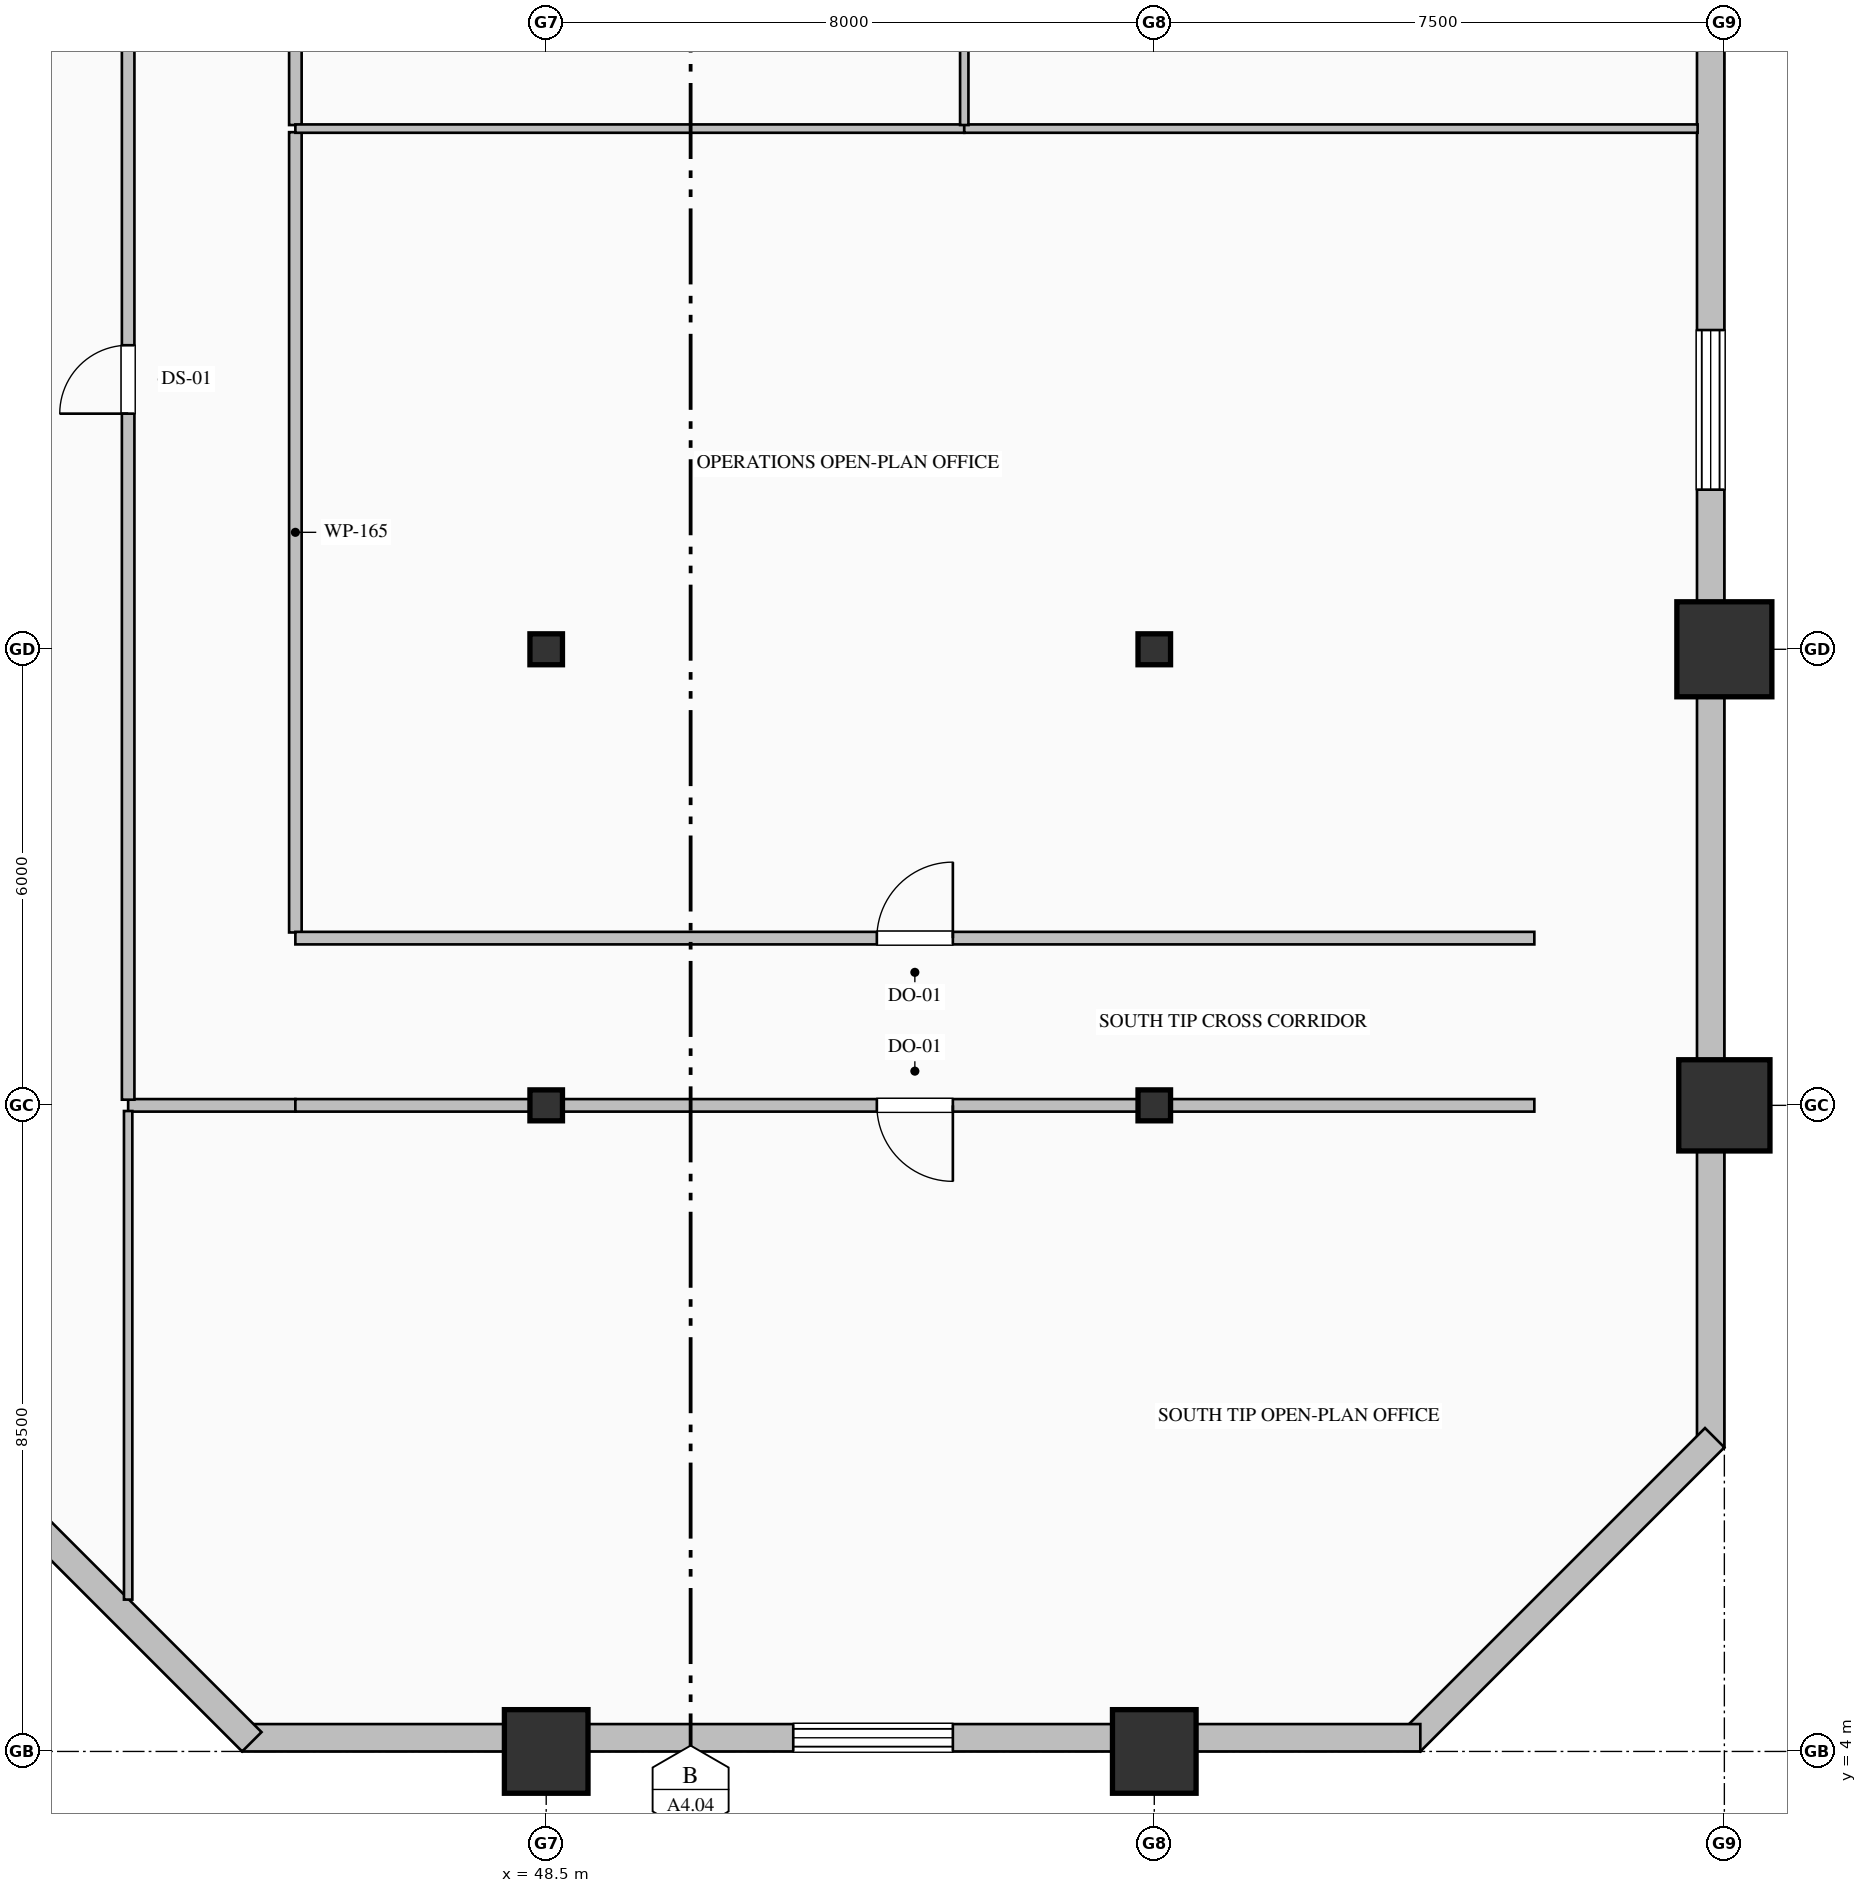
"""IFC4 building model, lengths in metres.
Left out: names, types, materials, properties, quantities, classifications, styles, units other than length and angle.
Written with IfcOpenShell. Run it as: python <this file> out.ifc"""

import sys

from ifc_helpers import new_model, si_unit, direction, frame, frame_2d, origin, origin_2d, place, context, subcontext, project, spatial, rectangle, hollow_rectangle, hollow_circle, i_section, extrude, element, fill, save


model = new_model("IFC4")
c1 = context("Model", 3, precision=1e-05, world=origin(), true_north=direction((0.0, 1.0)))
c2 = subcontext(c1, "Body", "Model", "MODEL_VIEW")
j1 = project(units=[si_unit("LENGTHUNIT", "METRE"), si_unit("PLANEANGLEUNIT", "RADIAN")], contexts=[c1])
p1 = place(None, origin())
s1 = spatial("IfcSite", under=j1, at=p1, CompositionType="ELEMENT")
p2 = place(p1, origin())
s2 = spatial("IfcBuilding", under=s1, at=p2, CompositionType="ELEMENT")
p3 = place(p2, frame((0.0, 0.0, 80.2)))
s3 = spatial("IfcBuildingStorey", under=s2, at=p3, CompositionType="ELEMENT", Elevation=80.2)
p4 = place(p3, frame((48.5, 4.0, 0.0), z_axis=(0.0, 0.0, 1.0), x_axis=(1.0, 0.0, 0.0)))
e1 = element("IfcColumn", 1, at=p4, inside=s3, PredefinedType="COLUMN", context=c2, shape_type="SweptSolid", body=[
    extrude(hollow_rectangle(XDim=1.1, YDim=1.1, WallThickness=0.04, at=origin_2d()), origin(), (0.0, 0.0, 1.0), 4.0),
])
for number, where, z_axis, x_axis in (
    (2, (48.5, 12.5, 0.0), (0.0, 0.0, 1.0), (1.0, 0.0, 0.0)),
    (3, (48.5, 18.5, 0.0), (0.0, 0.0, 1.0), (1.0, 0.0, 0.0)),
):
    element("IfcColumn", number, at=place(p3, frame(where, z_axis=z_axis, x_axis=x_axis)), inside=s3, PredefinedType="COLUMN", context=c2, shape_type="SweptSolid", body=[
        extrude(i_section(OverallWidth=0.407, OverallDepth=0.428, WebThickness=0.02, FlangeThickness=0.035, FilletRadius=0.022, at=origin_2d()), origin(), (0.0, 0.0, 1.0), 4.0),
    ])
p5 = place(p3, frame((56.5, 4.0, 0.0), z_axis=(0.0, 0.0, 1.0), x_axis=(1.0, 0.0, 0.0)))
e4 = element("IfcColumn", 4, at=p5, inside=s3, PredefinedType="COLUMN", context=c2, shape_type="SweptSolid", body=[
    extrude(hollow_rectangle(XDim=1.1, YDim=1.1, WallThickness=0.04, at=origin_2d()), origin(), (0.0, 0.0, 1.0), 4.0),
])
for number, where, z_axis, x_axis in (
    (5, (56.5, 12.5, 0.0), (0.0, 0.0, 1.0), (1.0, 0.0, 0.0)),
    (6, (56.5, 18.5, 0.0), (0.0, 0.0, 1.0), (1.0, 0.0, 0.0)),
):
    element("IfcColumn", number, at=place(p3, frame(where, z_axis=z_axis, x_axis=x_axis)), inside=s3, PredefinedType="COLUMN", context=c2, shape_type="SweptSolid", body=[
        extrude(i_section(OverallWidth=0.407, OverallDepth=0.428, WebThickness=0.02, FlangeThickness=0.035, FilletRadius=0.022, at=origin_2d()), origin(), (0.0, 0.0, 1.0), 4.0),
    ])
p6 = place(p3, frame((64.0, 12.5, 0.0), z_axis=(0.0, 0.0, 1.0), x_axis=(1.0, 0.0, 0.0)))
e7 = element("IfcColumn", 7, at=p6, inside=s3, PredefinedType="COLUMN", context=c2, shape_type="SweptSolid", body=[
    extrude(hollow_circle(Radius=0.6, WallThickness=0.04, at=origin_2d()), origin(), (0.0, 0.0, 1.0), 4.0),
])
p7 = place(p3, frame((64.0, 18.5, 0.0), z_axis=(0.0, 0.0, 1.0), x_axis=(1.0, 0.0, 0.0)))
e8 = element("IfcColumn", 8, at=p7, inside=s3, PredefinedType="COLUMN", context=c2, shape_type="SweptSolid", body=[
    extrude(hollow_rectangle(XDim=1.25, YDim=1.25, WallThickness=0.045, at=origin_2d()), origin(), (0.0, 0.0, 1.0), 4.0),
])
p8 = place(p3, frame((63.82, 36.05, 0.0), z_axis=(0.0, 0.0, 1.0), x_axis=(0.0, -1.0, 0.0)))
e9 = element("IfcWall", 9, at=p8, inside=s3, PredefinedType="SOLIDWALL", context=c2, shape_type="SweptSolid", body=[
    extrude(rectangle(XDim=28.05, YDim=0.36, at=frame_2d((14.025, 0.0))), origin(), (0.0, 0.0, 1.0), 3.25),
])
p9 = place(p8, frame((2.55, 0.0, 0.85)))
e10 = element("IfcOpeningElement", 10, at=p9, cuts=e9, PredefinedType="OPENING", context=c2, shape_type="SweptSolid", body=[
    extrude(rectangle(XDim=2.1, YDim=2.05, at=frame_2d((1.05, 1.025))), frame((0.0, 0.19, 0.0), z_axis=(0.0, -1.0, 0.0), x_axis=(1.0, 0.0, 0.0)), (0.0, 0.0, 1.0), 0.38),
])
p10 = place(p8, frame((13.35, 0.0, 0.85)))
e11 = element("IfcOpeningElement", 11, at=p10, cuts=e9, PredefinedType="OPENING", context=c2, shape_type="SweptSolid", body=[
    extrude(rectangle(XDim=2.1, YDim=2.05, at=frame_2d((1.05, 1.025))), frame((0.0, 0.19, 0.0), z_axis=(0.0, -1.0, 0.0), x_axis=(1.0, 0.0, 0.0)), (0.0, 0.0, 1.0), 0.38),
])
p11 = place(p3, frame((63.873, 8.127, 0.0), z_axis=(0.0, 0.0, 1.0), x_axis=(-0.707106781187, -0.707106781187, 0.0)))
e12 = element("IfcWall", 12, at=p11, inside=s3, PredefinedType="SOLIDWALL", context=c2, shape_type="SweptSolid", body=[
    extrude(rectangle(XDim=5.657, YDim=0.36, at=frame_2d((2.828, 0.0))), origin(), (0.0, 0.0, 1.0), 3.75),
])
p12 = place(p3, frame((60.0, 4.18, 0.0), z_axis=(0.0, 0.0, 1.0), x_axis=(-1.0, 0.0, 0.0)))
e13 = element("IfcWall", 13, at=p12, inside=s3, PredefinedType="SOLIDWALL", context=c2, shape_type="SweptSolid", body=[
    extrude(rectangle(XDim=15.5, YDim=0.36, at=frame_2d((7.75, 0.0))), origin(), (0.0, 0.0, 1.0), 3.25),
])
p13 = place(p12, frame((6.15, 0.0, 0.85)))
e14 = element("IfcOpeningElement", 14, at=p13, cuts=e13, PredefinedType="OPENING", context=c2, shape_type="SweptSolid", body=[
    extrude(rectangle(XDim=2.1, YDim=2.05, at=frame_2d((1.05, 1.025))), frame((0.0, 0.19, 0.0), z_axis=(0.0, -1.0, 0.0), x_axis=(1.0, 0.0, 0.0)), (0.0, 0.0, 1.0), 0.38),
])
p14 = place(p3, frame((44.627, 4.127, 0.0), z_axis=(0.0, 0.0, 1.0), x_axis=(-0.707106781187, 0.707106781187, 0.0)))
e15 = element("IfcWall", 15, at=p14, inside=s3, PredefinedType="SOLIDWALL", context=c2, shape_type="SweptSolid", body=[
    extrude(rectangle(XDim=5.657, YDim=0.36, at=frame_2d((2.828, 0.0))), origin(), (0.0, 0.0, 1.0), 3.75),
])
p15 = place(p3, frame((45.2, 12.5, 0.0), z_axis=(0.0, 0.0, 1.0), x_axis=(-1.0, 0.0, 0.0)))
e16 = element("IfcWall", 16, at=p15, inside=s3, PredefinedType="PARTITIONING", context=c2, shape_type="SweptSolid", body=[
    extrude(rectangle(XDim=2.2, YDim=0.165, at=frame_2d((1.1, 0.0))), origin(), (0.0, 0.0, 1.0), 3.042),
])
p16 = place(p3, frame((45.2, 25.303, 0.0), z_axis=(0.0, 0.0, 1.0), x_axis=(0.0, -1.0, 0.0)))
e17 = element("IfcWall", 17, at=p16, inside=s3, PredefinedType="PARTITIONING", context=c2, shape_type="SweptSolid", body=[
    extrude(rectangle(XDim=10.529, YDim=0.165, at=frame_2d((5.264, 0.0))), origin(), (0.0, 0.0, 1.0), 3.75),
])
p17 = place(p3, frame((45.2, 31.525, 0.0), z_axis=(0.0, 0.0, 1.0), x_axis=(0.0, -1.0, 0.0)))
e18 = element("IfcWall", 18, at=p17, inside=s3, PredefinedType="PARTITIONING", context=c2, shape_type="SweptSolid", body=[
    extrude(rectangle(XDim=6.128, YDim=0.165, at=frame_2d((3.064, 0.0))), origin(), (0.0, 0.0, 1.0), 3.75),
])
p18 = place(p3, frame((43.0, 12.574, 0.0), z_axis=(0.0, 0.0, 1.0), x_axis=(0.0, 1.0, 0.0)))
e19 = element("IfcWall", 19, at=p18, inside=s3, PredefinedType="PARTITIONING", context=c2, shape_type="SweptSolid", body=[
    extrude(rectangle(XDim=18.951, YDim=0.165, at=frame_2d((9.476, 0.0))), origin(), (0.0, 0.0, 1.0), 3.75),
])
p19 = place(p18, frame((9.025, 0.0, 0.0)))
e20 = element("IfcOpeningElement", 20, at=p19, cuts=e19, PredefinedType="OPENING", context=c2, shape_type="SweptSolid", body=[
    extrude(rectangle(XDim=0.9, YDim=2.15, at=frame_2d((0.45, 1.075))), frame((0.0, 0.093, 0.0), z_axis=(0.0, -1.0, 0.0), x_axis=(1.0, 0.0, 0.0)), (0.0, 0.0, 1.0), 0.185),
])
p20 = place(p3, frame((61.5, 12.5, 0.0), z_axis=(0.0, 0.0, 1.0), x_axis=(-1.0, 0.0, 0.0)))
e21 = element("IfcWall", 21, at=p20, inside=s3, PredefinedType="PARTITIONING", context=c2, shape_type="SweptSolid", body=[
    extrude(rectangle(XDim=16.3, YDim=0.165, at=frame_2d((8.15, 0.0))), origin(), (0.0, 0.0, 1.0), 3.042),
])
p21 = place(p20, frame((7.65, 0.0, 0.0)))
e22 = element("IfcOpeningElement", 22, at=p21, cuts=e21, PredefinedType="OPENING", context=c2, shape_type="SweptSolid", body=[
    extrude(rectangle(XDim=1.0, YDim=2.15, at=frame_2d((0.5, 1.075))), frame((0.0, 0.093, 0.0), z_axis=(0.0, -1.0, 0.0), x_axis=(1.0, 0.0, 0.0)), (0.0, 0.0, 1.0), 0.185),
])
p22 = place(p3, frame((45.2, 14.7, 0.0), z_axis=(0.0, 0.0, 1.0), x_axis=(1.0, 0.0, 0.0)))
e23 = element("IfcWall", 23, at=p22, inside=s3, PredefinedType="PARTITIONING", context=c2, shape_type="SweptSolid", body=[
    extrude(rectangle(XDim=16.3, YDim=0.165, at=frame_2d((8.15, 0.0))), origin(), (0.0, 0.0, 1.0), 3.75),
])
p23 = place(p22, frame((7.65, 0.0, 0.0)))
e24 = element("IfcOpeningElement", 24, at=p23, cuts=e23, PredefinedType="OPENING", context=c2, shape_type="SweptSolid", body=[
    extrude(rectangle(XDim=1.0, YDim=2.15, at=frame_2d((0.5, 1.075))), frame((0.0, 0.093, 0.0), z_axis=(0.0, -1.0, 0.0), x_axis=(1.0, 0.0, 0.0)), (0.0, 0.0, 1.0), 0.185),
])
p24 = place(p3, frame((43.0, 5.998, 0.0), z_axis=(0.0, 0.0, 1.0), x_axis=(0.0, 1.0, 0.0)))
e25 = element("IfcWall", 25, at=p24, inside=s3, PredefinedType="MOVABLE", context=c2, shape_type="SweptSolid", body=[
    extrude(rectangle(XDim=6.428, YDim=0.11, at=frame_2d((3.214, 0.0))), origin(), (0.0, 0.0, 1.0), 3.75),
])
p25 = place(p3, frame((45.2, 25.35, 0.0), z_axis=(0.0, 0.0, 1.0), x_axis=(1.0, 0.0, 0.0)))
e26 = element("IfcWall", 26, at=p25, inside=s3, PredefinedType="MOVABLE", context=c2, shape_type="SweptSolid", body=[
    extrude(rectangle(XDim=8.8, YDim=0.11, at=frame_2d((4.4, 0.0))), origin(), (0.0, 0.0, 1.0), 3.75),
])
p26 = place(p3, frame((54.0, 25.35, 0.0), z_axis=(0.0, 0.0, 1.0), x_axis=(1.0, 0.0, 0.0)))
e27 = element("IfcWall", 27, at=p26, inside=s3, PredefinedType="MOVABLE", context=c2, shape_type="SweptSolid", body=[
    extrude(rectangle(XDim=9.648, YDim=0.11, at=frame_2d((4.824, 0.0))), origin(), (0.0, 0.0, 1.0), 3.75),
])
p27 = place(p3, frame((54.0, 31.525, 0.0), z_axis=(0.0, 0.0, 1.0), x_axis=(0.0, -1.0, 0.0)))
e28 = element("IfcWall", 28, at=p27, inside=s3, PredefinedType="MOVABLE", context=c2, shape_type="SweptSolid", body=[
    extrude(rectangle(XDim=6.128, YDim=0.11, at=frame_2d((3.064, 0.0))), origin(), (0.0, 0.0, 1.0), 3.75),
])
p28 = place(p10, origin())
e29 = element("IfcWindow", 29, at=p28, inside=s3, PartitioningType="TRIPLE_PANEL_VERTICAL", PredefinedType="WINDOW", context=c2, shape_type="SweptSolid", body=[
    extrude(rectangle(XDim=2.1, YDim=2.05, at=frame_2d((1.05, 1.025))), frame((0.0, 0.15, 0.0), z_axis=(0.0, -1.0, 0.0), x_axis=(1.0, 0.0, 0.0)), (0.0, 0.0, 1.0), 0.06),
])
fill(e11, e29)
p29 = place(p13, origin())
e30 = element("IfcWindow", 30, at=p29, inside=s3, PartitioningType="TRIPLE_PANEL_VERTICAL", PredefinedType="WINDOW", context=c2, shape_type="SweptSolid", body=[
    extrude(rectangle(XDim=2.1, YDim=2.05, at=frame_2d((1.05, 1.025))), frame((0.0, 0.15, 0.0), z_axis=(0.0, -1.0, 0.0), x_axis=(1.0, 0.0, 0.0)), (0.0, 0.0, 1.0), 0.06),
])
fill(e14, e30)
p30 = place(p21, origin())
e31 = element("IfcDoor", 31, at=p30, inside=s3, OperationType="SINGLE_SWING_LEFT", PredefinedType="DOOR", context=c2, shape_type="SweptSolid", body=[
    extrude(rectangle(XDim=1.0, YDim=2.15, at=frame_2d((0.5, 1.075))), frame((0.0, 0.025, 0.0), z_axis=(0.0, -1.0, 0.0), x_axis=(1.0, 0.0, 0.0)), (0.0, 0.0, 1.0), 0.05),
])
fill(e22, e31)
p31 = place(p23, origin())
e32 = element("IfcDoor", 32, at=p31, inside=s3, OperationType="SINGLE_SWING_RIGHT", PredefinedType="DOOR", context=c2, shape_type="SweptSolid", body=[
    extrude(rectangle(XDim=1.0, YDim=2.15, at=frame_2d((0.5, 1.075))), frame((0.0, 0.025, 0.0), z_axis=(0.0, -1.0, 0.0), x_axis=(1.0, 0.0, 0.0)), (0.0, 0.0, 1.0), 0.05),
])
fill(e24, e32)
p32 = place(p19, origin())
e33 = element("IfcDoor", 33, at=p32, inside=s3, OperationType="SINGLE_SWING_LEFT", PredefinedType="DOOR", context=c2, shape_type="SweptSolid", body=[
    extrude(rectangle(XDim=0.9, YDim=2.15, at=frame_2d((0.45, 1.075))), frame((0.0, 0.025, 0.0), z_axis=(0.0, -1.0, 0.0), x_axis=(1.0, 0.0, 0.0)), (0.0, 0.0, 1.0), 0.05),
])
fill(e20, e33)
save(model, sys.argv[1])
